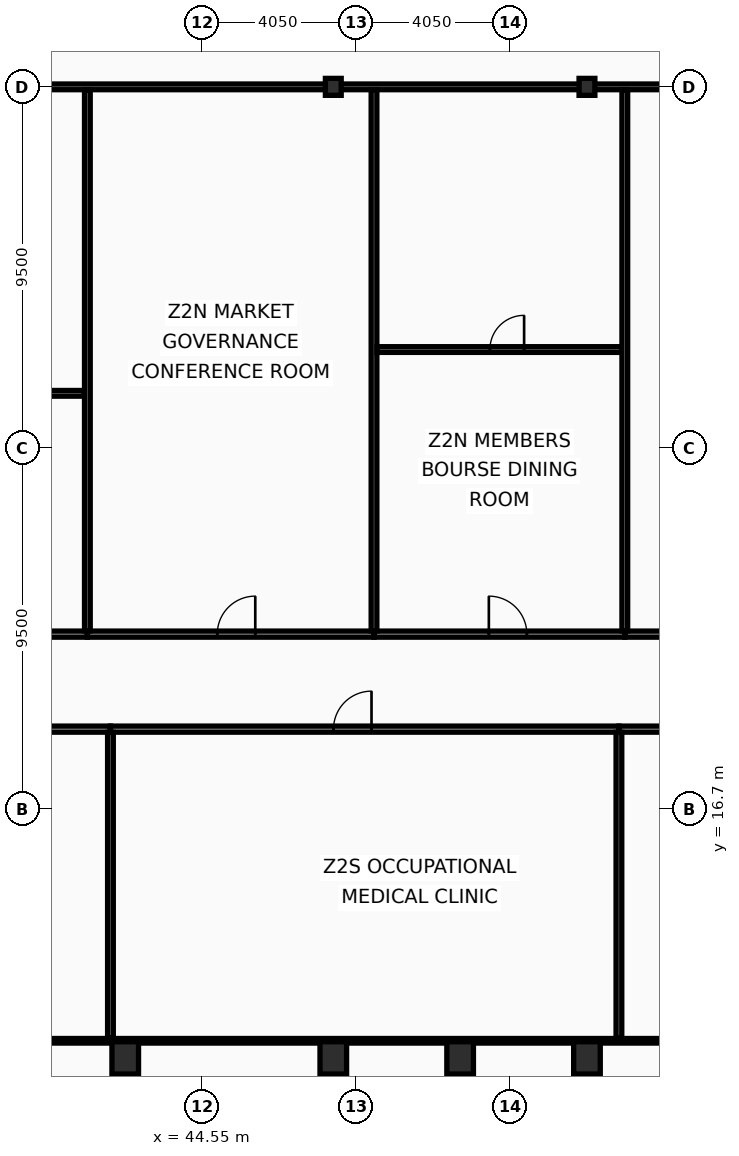
"""IFC4 building model, lengths in metres.
Left out: names, types, materials, properties, quantities, classifications, styles, units other than length and angle.
Written with IfcOpenShell. Run it as: python <this file> out.ifc"""

import sys

from ifc_helpers import new_model, si_unit, direction, frame, frame_2d, origin, origin_2d, place, context, subcontext, project, spatial, rectangle, hollow_rectangle, i_section, extrude, element, fill, save


model = new_model("IFC4")
c1 = context("Model", 3, precision=1e-05, world=origin(), true_north=direction((0.0, 1.0)))
c2 = subcontext(c1, "Body", "Model", "MODEL_VIEW")
j1 = project(units=[si_unit("LENGTHUNIT", "METRE"), si_unit("PLANEANGLEUNIT", "RADIAN")], contexts=[c1])
p1 = place(None, origin())
s1 = spatial("IfcSite", under=j1, at=p1, CompositionType="ELEMENT")
p2 = place(p1, origin())
s2 = spatial("IfcBuilding", under=s1, at=p2, CompositionType="ELEMENT")
p3 = place(p2, frame((0.0, 0.0, 114.6)))
s3 = spatial("IfcBuildingStorey", under=s2, at=p3, CompositionType="ELEMENT", Elevation=114.6)
for number, where, z_axis, x_axis in (
    (1, (42.525, 10.15, 0.0), (0.0, 0.0, 1.0), (1.0, 0.0, 0.0)),
    (2, (48.0, 10.15, 0.0), (0.0, 0.0, 1.0), (1.0, 0.0, 0.0)),
    (3, (51.337, 10.15, 0.0), (0.0, 0.0, 1.0), (1.0, 0.0, 0.0)),
    (4, (54.675, 10.15, 0.0), (0.0, 0.0, 1.0), (1.0, 0.0, 0.0)),
):
    element("IfcColumn", number, at=place(p3, frame(where, z_axis=z_axis, x_axis=x_axis)), inside=s3, PredefinedType="COLUMN", context=c2, shape_type="SweptSolid", body=[
        extrude(hollow_rectangle(XDim=0.7, YDim=0.85, WallThickness=0.05, at=origin_2d()), origin(), (0.0, 0.0, 1.0), 3.6),
    ])
for number, where, z_axis, x_axis in (
    (5, (48.0, 35.7, 0.0), (0.0, 0.0, 1.0), (1.0, 0.0, 0.0)),
    (6, (54.675, 35.7, 0.0), (0.0, 0.0, 1.0), (1.0, 0.0, 0.0)),
):
    element("IfcColumn", number, at=place(p3, frame(where, z_axis=z_axis, x_axis=x_axis)), inside=s3, PredefinedType="COLUMN", context=c2, shape_type="SweptSolid", body=[
        extrude(i_section(OverallWidth=0.416, OverallDepth=0.446, WebThickness=0.039, FlangeThickness=0.063, at=origin_2d()), origin(), (0.0, 0.0, 1.0), 3.6),
    ])
p4 = place(p3, frame((23.878, 18.8, 0.0), z_axis=(0.0, 0.0, 1.0), x_axis=(1.0, 0.0, 0.0)))
e7 = element("IfcWall", 7, at=p4, inside=s3, PredefinedType="PARTITIONING", context=c2, shape_type="SweptSolid", body=[
    extrude(rectangle(XDim=18.258, YDim=0.16, at=frame_2d((9.129, 0.0))), origin(), (0.0, 0.0, 1.0), 2.73),
])
p5 = place(p4, frame((7.918, 0.0, 0.0)))
e8 = element("IfcOpeningElement", 8, at=p5, cuts=e7, PredefinedType="OPENING", context=c2, shape_type="SweptSolid", body=[
    extrude(rectangle(XDim=1.6, YDim=2.15, at=frame_2d((0.8, 1.075))), frame((0.0, 0.09, 0.0), z_axis=(0.0, -1.0, 0.0), x_axis=(1.0, 0.0, 0.0)), (0.0, 0.0, 1.0), 0.18),
])
p6 = place(p3, frame((42.136, 18.8, 0.0), z_axis=(0.0, 0.0, 1.0), x_axis=(1.0, 0.0, 0.0)))
e9 = element("IfcWall", 9, at=p6, inside=s3, PredefinedType="PARTITIONING", context=c2, shape_type="SweptSolid", body=[
    extrude(rectangle(XDim=13.38, YDim=0.16, at=frame_2d((6.69, 0.0))), origin(), (0.0, 0.0, 1.0), 2.73),
])
p7 = place(p6, frame((5.87, 0.0, 0.0)))
e10 = element("IfcOpeningElement", 10, at=p7, cuts=e9, PredefinedType="OPENING", context=c2, shape_type="SweptSolid", body=[
    extrude(rectangle(XDim=1.0, YDim=2.05, at=frame_2d((0.5, 1.025))), frame((0.0, 0.09, 0.0), z_axis=(0.0, -1.0, 0.0), x_axis=(1.0, 0.0, 0.0)), (0.0, 0.0, 1.0), 0.18),
])
p8 = place(p3, frame((42.136, 10.665, 0.0), z_axis=(0.0, 0.0, 1.0), x_axis=(0.0, 1.0, 0.0)))
e11 = element("IfcWall", 11, at=p8, inside=s3, PredefinedType="PARTITIONING", context=c2, shape_type="SweptSolid", body=[
    extrude(rectangle(XDim=8.05, YDim=0.15, at=frame_2d((4.025, 0.0))), origin(), (0.0, 0.0, 1.0), 2.73),
])
p9 = place(p3, frame((55.516, 18.8, 0.0), z_axis=(0.0, 0.0, 1.0), x_axis=(1.0, 0.0, 0.0)))
e12 = element("IfcWall", 12, at=p9, inside=s3, PredefinedType="PARTITIONING", context=c2, shape_type="SweptSolid", body=[
    extrude(rectangle(XDim=13.354, YDim=0.16, at=frame_2d((6.677, 0.0))), origin(), (0.0, 0.0, 1.0), 2.73),
])
p10 = place(p9, frame((5.859, 0.0, 0.0)))
e13 = element("IfcOpeningElement", 13, at=p10, cuts=e12, PredefinedType="OPENING", context=c2, shape_type="SweptSolid", body=[
    extrude(rectangle(XDim=1.0, YDim=2.05, at=frame_2d((0.5, 1.025))), frame((0.0, 0.09, 0.0), z_axis=(0.0, -1.0, 0.0), x_axis=(1.0, 0.0, 0.0)), (0.0, 0.0, 1.0), 0.18),
])
p11 = place(p3, frame((55.516, 10.665, 0.0), z_axis=(0.0, 0.0, 1.0), x_axis=(0.0, 1.0, 0.0)))
e14 = element("IfcWall", 14, at=p11, inside=s3, PredefinedType="PARTITIONING", context=c2, shape_type="SweptSolid", body=[
    extrude(rectangle(XDim=8.05, YDim=0.15, at=frame_2d((4.025, 0.0))), origin(), (0.0, 0.0, 1.0), 3.44),
])
p12 = place(p3, frame((21.81, 35.7, 0.0), z_axis=(0.0, 0.0, 1.0), x_axis=(1.0, 0.0, 0.0)))
e15 = element("IfcWall", 15, at=p12, inside=s3, PredefinedType="PARTITIONING", context=c2, shape_type="SweptSolid", body=[
    extrude(rectangle(XDim=46.995, YDim=0.15, at=frame_2d((23.498, 0.0))), origin(), (0.0, 0.0, 1.0), 2.73),
])
p13 = place(p3, frame((34.458, 21.3, 0.0), z_axis=(0.0, 0.0, 1.0), x_axis=(1.0, 0.0, 0.0)))
e16 = element("IfcWall", 16, at=p13, inside=s3, PredefinedType="PARTITIONING", context=c2, shape_type="SweptSolid", body=[
    extrude(rectangle(XDim=7.071, YDim=0.16, at=frame_2d((3.536, 0.0))), origin(), (0.0, 0.0, 1.0), 3.44),
])
p14 = place(p13, frame((3.22, 0.0, 0.0)))
e17 = element("IfcOpeningElement", 17, at=p14, cuts=e16, PredefinedType="OPENING", context=c2, shape_type="SweptSolid", body=[
    extrude(rectangle(XDim=1.0, YDim=2.05, at=frame_2d((0.5, 1.025))), frame((0.0, 0.09, 0.0), z_axis=(0.0, -1.0, 0.0), x_axis=(1.0, 0.0, 0.0)), (0.0, 0.0, 1.0), 0.18),
])
p15 = place(p3, frame((34.538, 27.636, 0.0), z_axis=(0.0, 0.0, 1.0), x_axis=(1.0, 0.0, 0.0)))
e18 = element("IfcWall", 18, at=p15, inside=s3, PredefinedType="PARTITIONING", context=c2, shape_type="SweptSolid", body=[
    extrude(rectangle(XDim=6.911, YDim=0.15, at=frame_2d((3.456, 0.0))), origin(), (0.0, 0.0, 1.0), 3.44),
])
p16 = place(p15, frame((3.182, 0.0, 0.0)))
e19 = element("IfcOpeningElement", 19, at=p16, cuts=e18, PredefinedType="OPENING", context=c2, shape_type="SweptSolid", body=[
    extrude(rectangle(XDim=0.9, YDim=2.05, at=frame_2d((0.45, 1.025))), frame((0.0, 0.085, 0.0), z_axis=(0.0, -1.0, 0.0), x_axis=(1.0, 0.0, 0.0)), (0.0, 0.0, 1.0), 0.17),
])
p17 = place(p3, frame((41.529, 21.3, 0.0), z_axis=(0.0, 0.0, 1.0), x_axis=(1.0, 0.0, 0.0)))
e20 = element("IfcWall", 20, at=p17, inside=s3, PredefinedType="PARTITIONING", context=c2, shape_type="SweptSolid", body=[
    extrude(rectangle(XDim=7.542, YDim=0.16, at=frame_2d((3.771, 0.0))), origin(), (0.0, 0.0, 1.0), 2.73),
])
p18 = place(p17, frame((3.418, 0.0, 0.0)))
e21 = element("IfcOpeningElement", 21, at=p18, cuts=e20, PredefinedType="OPENING", context=c2, shape_type="SweptSolid", body=[
    extrude(rectangle(XDim=1.0, YDim=2.05, at=frame_2d((0.5, 1.025))), frame((0.0, 0.09, 0.0), z_axis=(0.0, -1.0, 0.0), x_axis=(1.0, 0.0, 0.0)), (0.0, 0.0, 1.0), 0.18),
])
p19 = place(p3, frame((41.529, 21.385, 0.0), z_axis=(0.0, 0.0, 1.0), x_axis=(0.0, 1.0, 0.0)))
e22 = element("IfcWall", 22, at=p19, inside=s3, PredefinedType="PARTITIONING", context=c2, shape_type="SweptSolid", body=[
    extrude(rectangle(XDim=14.235, YDim=0.15, at=frame_2d((7.118, 0.0))), origin(), (0.0, 0.0, 1.0), 2.88),
])
p20 = place(p3, frame((49.071, 21.3, 0.0), z_axis=(0.0, 0.0, 1.0), x_axis=(1.0, 0.0, 0.0)))
e23 = element("IfcWall", 23, at=p20, inside=s3, PredefinedType="PARTITIONING", context=c2, shape_type="SweptSolid", body=[
    extrude(rectangle(XDim=6.6, YDim=0.16, at=frame_2d((3.3, 0.0))), origin(), (0.0, 0.0, 1.0), 2.73),
])
p21 = place(p20, frame((3.022, 0.0, 0.0)))
e24 = element("IfcOpeningElement", 24, at=p21, cuts=e23, PredefinedType="OPENING", context=c2, shape_type="SweptSolid", body=[
    extrude(rectangle(XDim=1.0, YDim=2.05, at=frame_2d((0.5, 1.025))), frame((0.0, 0.09, 0.0), z_axis=(0.0, -1.0, 0.0), x_axis=(1.0, 0.0, 0.0)), (0.0, 0.0, 1.0), 0.18),
])
p22 = place(p3, frame((49.071, 21.385, 0.0), z_axis=(0.0, 0.0, 1.0), x_axis=(0.0, 1.0, 0.0)))
e25 = element("IfcWall", 25, at=p22, inside=s3, PredefinedType="PARTITIONING", context=c2, shape_type="SweptSolid", body=[
    extrude(rectangle(XDim=14.235, YDim=0.15, at=frame_2d((7.118, 0.0))), origin(), (0.0, 0.0, 1.0), 2.88),
])
p23 = place(p3, frame((49.151, 28.788, 0.0), z_axis=(0.0, 0.0, 1.0), x_axis=(1.0, 0.0, 0.0)))
e26 = element("IfcWall", 26, at=p23, inside=s3, PredefinedType="PARTITIONING", context=c2, shape_type="SweptSolid", body=[
    extrude(rectangle(XDim=6.44, YDim=0.15, at=frame_2d((3.22, 0.0))), origin(), (0.0, 0.0, 1.0), 2.73),
])
p24 = place(p23, frame((2.97, 0.0, 0.0)))
e27 = element("IfcOpeningElement", 27, at=p24, cuts=e26, PredefinedType="OPENING", context=c2, shape_type="SweptSolid", body=[
    extrude(rectangle(XDim=0.9, YDim=2.05, at=frame_2d((0.45, 1.025))), frame((0.0, 0.085, 0.0), z_axis=(0.0, -1.0, 0.0), x_axis=(1.0, 0.0, 0.0)), (0.0, 0.0, 1.0), 0.17),
])
p25 = place(p3, frame((55.671, 21.3, 0.0), z_axis=(0.0, 0.0, 1.0), x_axis=(1.0, 0.0, 0.0)))
e28 = element("IfcWall", 28, at=p25, inside=s3, PredefinedType="PARTITIONING", context=c2, shape_type="SweptSolid", body=[
    extrude(rectangle(XDim=7.071, YDim=0.16, at=frame_2d((3.535, 0.0))), origin(), (0.0, 0.0, 1.0), 3.44),
])
p26 = place(p25, frame((3.22, 0.0, 0.0)))
e29 = element("IfcOpeningElement", 29, at=p26, cuts=e28, PredefinedType="OPENING", context=c2, shape_type="SweptSolid", body=[
    extrude(rectangle(XDim=1.0, YDim=2.05, at=frame_2d((0.5, 1.025))), frame((0.0, 0.09, 0.0), z_axis=(0.0, -1.0, 0.0), x_axis=(1.0, 0.0, 0.0)), (0.0, 0.0, 1.0), 0.18),
])
p27 = place(p3, frame((55.671, 21.385, 0.0), z_axis=(0.0, 0.0, 1.0), x_axis=(0.0, 1.0, 0.0)))
e30 = element("IfcWall", 30, at=p27, inside=s3, PredefinedType="PARTITIONING", context=c2, shape_type="SweptSolid", body=[
    extrude(rectangle(XDim=14.235, YDim=0.15, at=frame_2d((7.118, 0.0))), origin(), (0.0, 0.0, 1.0), 2.73),
])
p28 = place(p3, frame((4.095, 10.6, 0.0), z_axis=(0.0, 0.0, 1.0), x_axis=(1.0, 0.0, 0.0)))
e31 = element("IfcWall", 31, at=p28, inside=s3, PredefinedType="PARTITIONING", context=c2, shape_type="SweptSolid", body=[
    extrude(rectangle(XDim=64.71, YDim=0.12, at=frame_2d((32.355, 0.0))), origin(), (0.0, 0.0, 1.0), 2.73),
])
p29 = place(p7, origin())
e32 = element("IfcDoor", 32, at=p29, inside=s3, OperationType="SINGLE_SWING_RIGHT", PredefinedType="DOOR", context=c2, shape_type="SweptSolid", body=[
    extrude(rectangle(XDim=1.0, YDim=2.05, at=frame_2d((0.5, 1.025))), frame((0.0, 0.025, 0.0), z_axis=(0.0, -1.0, 0.0), x_axis=(1.0, 0.0, 0.0)), (0.0, 0.0, 1.0), 0.05),
])
fill(e10, e32)
p30 = place(p18, origin())
e33 = element("IfcDoor", 33, at=p30, inside=s3, OperationType="SINGLE_SWING_RIGHT", PredefinedType="DOOR", context=c2, shape_type="SweptSolid", body=[
    extrude(rectangle(XDim=1.0, YDim=2.05, at=frame_2d((0.5, 1.025))), frame((0.0, 0.025, 0.0), z_axis=(0.0, -1.0, 0.0), x_axis=(1.0, 0.0, 0.0)), (0.0, 0.0, 1.0), 0.05),
])
fill(e21, e33)
p31 = place(p21, origin())
e34 = element("IfcDoor", 34, at=p31, inside=s3, OperationType="SINGLE_SWING_LEFT", PredefinedType="DOOR", context=c2, shape_type="SweptSolid", body=[
    extrude(rectangle(XDim=1.0, YDim=2.05, at=frame_2d((0.5, 1.025))), frame((0.0, 0.025, 0.0), z_axis=(0.0, -1.0, 0.0), x_axis=(1.0, 0.0, 0.0)), (0.0, 0.0, 1.0), 0.05),
])
fill(e24, e34)
p32 = place(p24, origin())
e35 = element("IfcDoor", 35, at=p32, inside=s3, OperationType="SINGLE_SWING_RIGHT", PredefinedType="DOOR", context=c2, shape_type="SweptSolid", body=[
    extrude(rectangle(XDim=0.9, YDim=2.05, at=frame_2d((0.45, 1.025))), frame((0.0, 0.025, 0.0), z_axis=(0.0, -1.0, 0.0), x_axis=(1.0, 0.0, 0.0)), (0.0, 0.0, 1.0), 0.05),
])
fill(e27, e35)
save(model, sys.argv[1])
